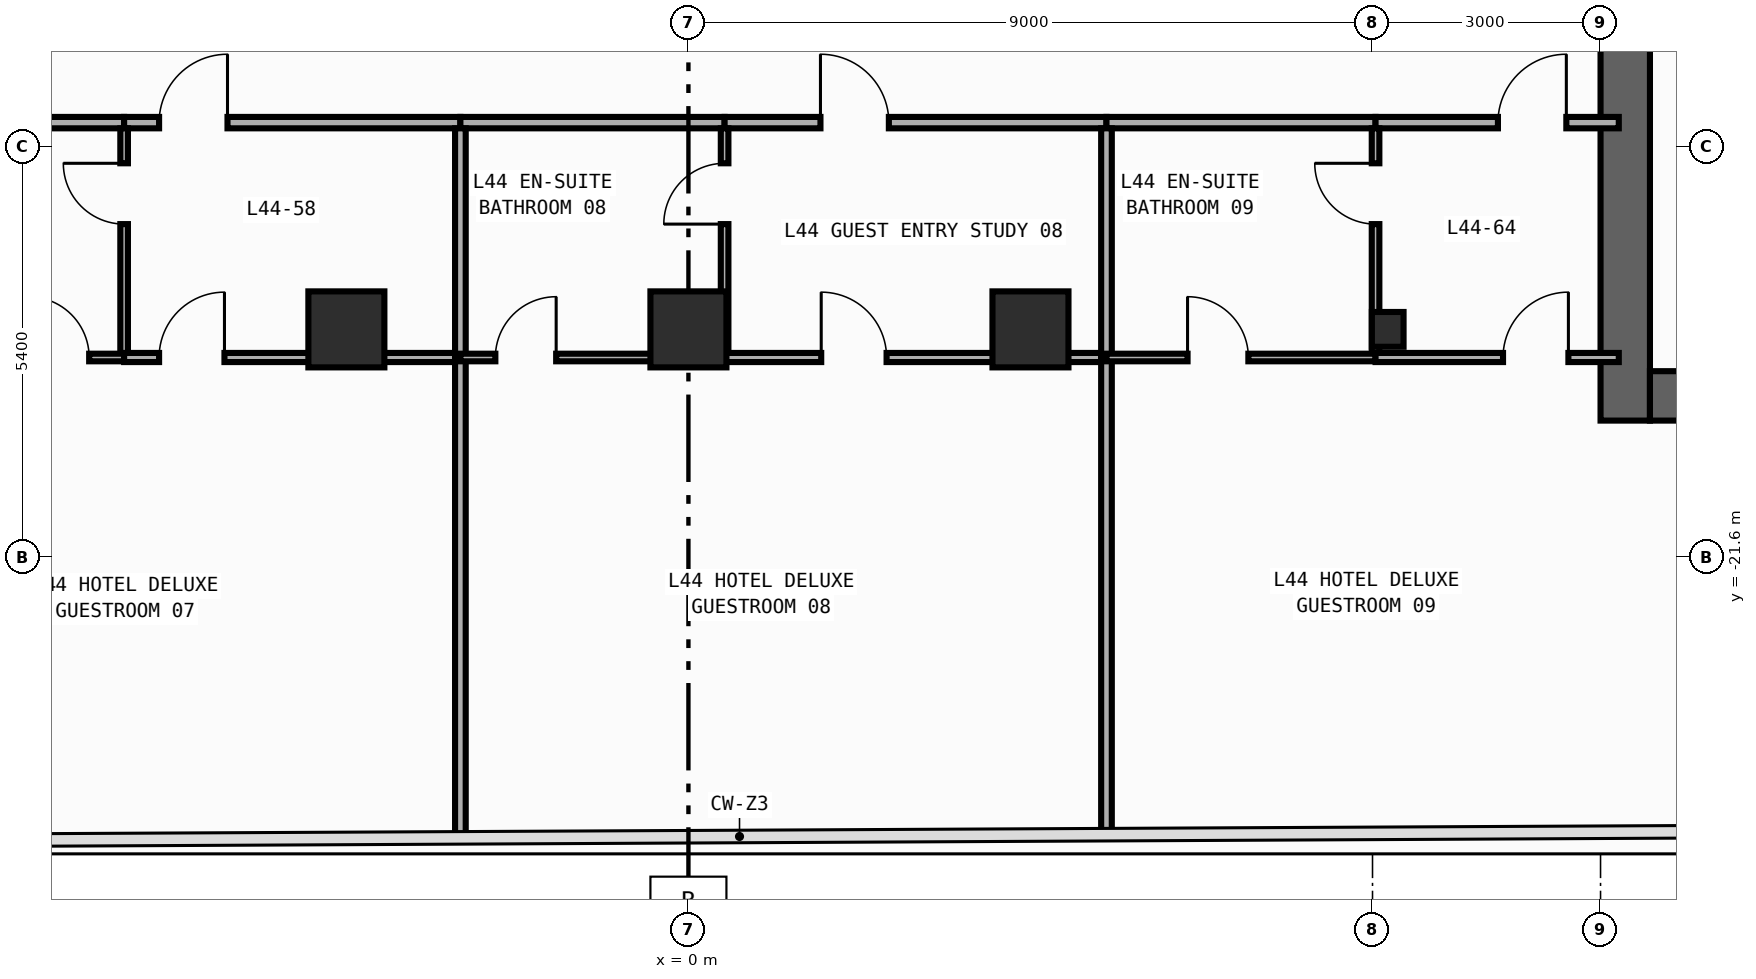
"""IFC4 building model, lengths in metres.
Left out: names, types, materials, properties, quantities, classifications, styles, units other than length and angle.
Written with IfcOpenShell. Run it as: python <this file> out.ifc"""

import sys

from ifc_helpers import new_model, si_unit, direction, frame, frame_2d, origin, origin_2d, place, context, subcontext, project, spatial, rectangle, i_section, extrude, element, fill, save


model = new_model("IFC4")
c1 = context("Model", 3, precision=1e-05, world=origin(), true_north=direction((0.0, 1.0)))
c2 = subcontext(c1, "Body", "Model", "MODEL_VIEW")
j1 = project(units=[si_unit("LENGTHUNIT", "METRE"), si_unit("PLANEANGLEUNIT", "RADIAN")], contexts=[c1])
p1 = place(None, origin())
s1 = spatial("IfcSite", under=j1, at=p1, CompositionType="ELEMENT")
p2 = place(p1, origin())
s2 = spatial("IfcBuilding", under=s1, at=p2, CompositionType="ELEMENT")
p3 = place(p2, frame((0.0, 0.0, 191.6)))
s3 = spatial("IfcBuildingStorey", under=s2, at=p3, CompositionType="ELEMENT", Elevation=191.6)
p4 = place(p3, frame((12.325, -19.8, 0.0), z_axis=(0.0, 0.0, 1.0), x_axis=(0.0, 1.0, 0.0)))
e1 = element("IfcWall", 1, at=p4, inside=s3, PredefinedType="SHEAR", context=c2, shape_type="SweptSolid", body=[
    extrude(rectangle(XDim=27.0, YDim=0.65, at=frame_2d((13.5, 0.0))), origin(), (0.0, 0.0, 1.0), 3.54),
])
p5 = place(p4, frame((23.05, 0.0, 0.0)))
e2 = element("IfcOpeningElement", 2, at=p5, cuts=e1, PredefinedType="OPENING", context=c2, shape_type="SweptSolid", body=[
    extrude(rectangle(XDim=1.1, YDim=2.2, at=frame_2d((0.55, 1.1))), frame((0.0, 0.335, 0.0), z_axis=(0.0, -1.0, 0.0), x_axis=(1.0, 0.0, 0.0)), (0.0, 0.0, 1.0), 0.67),
])
p6 = place(p4, frame((19.85, 0.0, 0.0)))
e3 = element("IfcOpeningElement", 3, at=p6, cuts=e1, PredefinedType="OPENING", context=c2, shape_type="SweptSolid", body=[
    extrude(rectangle(XDim=1.1, YDim=2.2, at=frame_2d((0.55, 1.1))), frame((0.0, 0.335, 0.0), z_axis=(0.0, -1.0, 0.0), x_axis=(1.0, 0.0, 0.0)), (0.0, 0.0, 1.0), 0.67),
])
p7 = place(p4, frame((16.65, 0.0, 0.0)))
e4 = element("IfcOpeningElement", 4, at=p7, cuts=e1, PredefinedType="OPENING", context=c2, shape_type="SweptSolid", body=[
    extrude(rectangle(XDim=1.1, YDim=2.2, at=frame_2d((0.55, 1.1))), frame((0.0, 0.335, 0.0), z_axis=(0.0, -1.0, 0.0), x_axis=(1.0, 0.0, 0.0)), (0.0, 0.0, 1.0), 0.67),
])
p8 = place(p4, frame((7.175, 0.0, 0.0)))
e5 = element("IfcOpeningElement", 5, at=p8, cuts=e1, PredefinedType="OPENING", context=c2, shape_type="SweptSolid", body=[
    extrude(rectangle(XDim=0.85, YDim=2.1, at=frame_2d((0.425, 1.05))), frame((0.0, 0.335, 0.0), z_axis=(0.0, -1.0, 0.0), x_axis=(1.0, 0.0, 0.0)), (0.0, 0.0, 1.0), 0.67),
])
p9 = place(p4, frame((10.375, 0.0, 0.0)))
e6 = element("IfcOpeningElement", 6, at=p9, cuts=e1, PredefinedType="OPENING", context=c2, shape_type="SweptSolid", body=[
    extrude(rectangle(XDim=0.85, YDim=2.1, at=frame_2d((0.425, 1.05))), frame((0.0, 0.335, 0.0), z_axis=(0.0, -1.0, 0.0), x_axis=(1.0, 0.0, 0.0)), (0.0, 0.0, 1.0), 0.67),
])
p10 = place(p4, frame((12.725, 0.0, 0.0)))
e7 = element("IfcOpeningElement", 7, at=p10, cuts=e1, PredefinedType="OPENING", context=c2, shape_type="SweptSolid", body=[
    extrude(rectangle(XDim=1.15, YDim=2.2, at=frame_2d((0.575, 1.1))), frame((0.0, 0.335, 0.0), z_axis=(0.0, -1.0, 0.0), x_axis=(1.0, 0.0, 0.0)), (0.0, 0.0, 1.0), 0.67),
])
p11 = place(p4, frame((25.125, 0.0, 0.0)))
e8 = element("IfcOpeningElement", 8, at=p11, cuts=e1, PredefinedType="OPENING", context=c2, shape_type="SweptSolid", body=[
    extrude(rectangle(XDim=0.85, YDim=2.1, at=frame_2d((0.425, 1.05))), frame((0.0, 0.335, 0.0), z_axis=(0.0, -1.0, 0.0), x_axis=(1.0, 0.0, 0.0)), (0.0, 0.0, 1.0), 0.67),
])
p12 = place(p3, frame((12.65, -19.475, 0.0), z_axis=(0.0, 0.0, 1.0), x_axis=(1.0, 0.0, 0.0)))
e9 = element("IfcWall", 9, at=p12, inside=s3, PredefinedType="SHEAR", context=c2, shape_type="SweptSolid", body=[
    extrude(rectangle(XDim=7.1, YDim=0.65, at=frame_2d((3.55, 0.0))), origin(), (0.0, 0.0, 1.0), 3.54),
])
p13 = place(p3, frame((9.2, -18.6, 0.0), z_axis=(0.0, 0.0, 1.0), x_axis=(1.0, 0.0, 0.0)))
e10 = element("IfcColumn", 10, at=p13, inside=s3, PredefinedType="COLUMN", context=c2, shape_type="SweptSolid", body=[
    extrude(i_section(OverallWidth=0.417, OverallDepth=0.458, WebThickness=0.03, FlangeThickness=0.05, FilletRadius=0.022, at=origin_2d()), origin(), (0.0, 0.0, 1.0), 3.8),
])
for number, where, z_axis, x_axis in (
    (11, (-4.5, -18.6, 0.0), (0.0, 0.0, 1.0), (1.0, 0.0, 0.0)),
    (12, (0.0, -18.6, 0.0), (0.0, 0.0, 1.0), (1.0, 0.0, 0.0)),
    (13, (4.5, -18.6, 0.0), (0.0, 0.0, 1.0), (1.0, 0.0, 0.0)),
):
    element("IfcColumn", number, at=place(p3, frame(where, z_axis=z_axis, x_axis=x_axis)), inside=s3, PredefinedType="COLUMN", context=c2, shape_type="SweptSolid", body=[
        extrude(rectangle(XDim=1.0, YDim=1.0, at=origin_2d()), origin(), (0.0, 0.0, 1.0), 3.8),
    ])
p14 = place(p3, frame((-10.5, -15.88, 0.0), z_axis=(0.0, 0.0, 1.0), x_axis=(1.0, 0.0, 0.0)))
e14 = element("IfcWall", 14, at=p14, inside=s3, PredefinedType="PARTITIONING", context=c2, shape_type="SweptSolid", body=[
    extrude(rectangle(XDim=3.076, YDim=0.15, at=frame_2d((1.538, 0.0))), origin(), (0.0, 0.0, 1.0), 3.54),
])
p15 = place(p3, frame((-7.424, -15.88, 0.0), z_axis=(0.0, 0.0, 1.0), x_axis=(1.0, 0.0, 0.0)))
e15 = element("IfcWall", 15, at=p15, inside=s3, PredefinedType="PARTITIONING", context=c2, shape_type="SweptSolid", body=[
    extrude(rectangle(XDim=4.424, YDim=0.15, at=frame_2d((2.212, 0.0))), origin(), (0.0, 0.0, 1.0), 3.54),
])
p16 = place(p15, frame((0.46, 0.0, 0.0)))
e16 = element("IfcOpeningElement", 16, at=p16, cuts=e15, PredefinedType="OPENING", context=c2, shape_type="SweptSolid", body=[
    extrude(rectangle(XDim=0.9, YDim=2.15, at=frame_2d((0.45, 1.075))), frame((0.0, 0.085, 0.0), z_axis=(0.0, -1.0, 0.0), x_axis=(1.0, 0.0, 0.0)), (0.0, 0.0, 1.0), 0.17),
])
p17 = place(p3, frame((-3.0, -15.88, 0.0), z_axis=(0.0, 0.0, 1.0), x_axis=(1.0, 0.0, 0.0)))
e17 = element("IfcWall", 17, at=p17, inside=s3, PredefinedType="PARTITIONING", context=c2, shape_type="SweptSolid", body=[
    extrude(rectangle(XDim=3.476, YDim=0.15, at=frame_2d((1.738, 0.0))), origin(), (0.0, 0.0, 1.0), 3.54),
])
p18 = place(p3, frame((0.476, -15.88, 0.0), z_axis=(0.0, 0.0, 1.0), x_axis=(1.0, 0.0, 0.0)))
e18 = element("IfcWall", 18, at=p18, inside=s3, PredefinedType="PARTITIONING", context=c2, shape_type="SweptSolid", body=[
    extrude(rectangle(XDim=5.024, YDim=0.15, at=frame_2d((2.512, 0.0))), origin(), (0.0, 0.0, 1.0), 3.54),
])
p19 = place(p18, frame((1.261, 0.0, 0.0)))
e19 = element("IfcOpeningElement", 19, at=p19, cuts=e18, PredefinedType="OPENING", context=c2, shape_type="SweptSolid", body=[
    extrude(rectangle(XDim=0.9, YDim=2.15, at=frame_2d((0.45, 1.075))), frame((0.0, 0.085, 0.0), z_axis=(0.0, -1.0, 0.0), x_axis=(1.0, 0.0, 0.0)), (0.0, 0.0, 1.0), 0.17),
])
p20 = place(p3, frame((5.5, -15.88, 0.0), z_axis=(0.0, 0.0, 1.0), x_axis=(1.0, 0.0, 0.0)))
e20 = element("IfcWall", 20, at=p20, inside=s3, PredefinedType="PARTITIONING", context=c2, shape_type="SweptSolid", body=[
    extrude(rectangle(XDim=3.54, YDim=0.15, at=frame_2d((1.77, 0.0))), origin(), (0.0, 0.0, 1.0), 3.54),
])
p21 = place(p3, frame((9.04, -15.88, 0.0), z_axis=(0.0, 0.0, 1.0), x_axis=(1.0, 0.0, 0.0)))
e21 = element("IfcWall", 21, at=p21, inside=s3, PredefinedType="PARTITIONING", context=c2, shape_type="SweptSolid", body=[
    extrude(rectangle(XDim=3.2, YDim=0.15, at=frame_2d((1.6, 0.0))), origin(), (0.0, 0.0, 1.0), 3.54),
])
p22 = place(p21, frame((1.61, 0.0, 0.0)))
e22 = element("IfcOpeningElement", 22, at=p22, cuts=e21, PredefinedType="OPENING", context=c2, shape_type="SweptSolid", body=[
    extrude(rectangle(XDim=0.9, YDim=2.15, at=frame_2d((0.45, 1.075))), frame((0.0, 0.085, 0.0), z_axis=(0.0, -1.0, 0.0), x_axis=(1.0, 0.0, 0.0)), (0.0, 0.0, 1.0), 0.17),
])
p23 = place(p3, frame((-7.424, -18.92, 0.0), z_axis=(0.0, 0.0, 1.0), x_axis=(0.0, 1.0, 0.0)))
e23 = element("IfcWall", 23, at=p23, inside=s3, PredefinedType="PARTITIONING", context=c2, shape_type="SweptSolid", body=[
    extrude(rectangle(XDim=2.965, YDim=0.1, at=frame_2d((1.482, 0.0))), origin(), (0.0, 0.0, 1.0), 3.54),
])
p24 = place(p23, frame((1.705, 0.0, 0.0)))
e24 = element("IfcOpeningElement", 24, at=p24, cuts=e23, PredefinedType="OPENING", context=c2, shape_type="SweptSolid", body=[
    extrude(rectangle(XDim=0.8, YDim=2.1, at=frame_2d((0.4, 1.05))), frame((0.0, 0.06, 0.0), z_axis=(0.0, -1.0, 0.0), x_axis=(1.0, 0.0, 0.0)), (0.0, 0.0, 1.0), 0.12),
])
p25 = place(p3, frame((-10.5, -18.97, 0.0), z_axis=(0.0, 0.0, 1.0), x_axis=(1.0, 0.0, 0.0)))
e25 = element("IfcWall", 25, at=p25, inside=s3, PredefinedType="PARTITIONING", context=c2, shape_type="SweptSolid", body=[
    extrude(rectangle(XDim=3.076, YDim=0.1, at=frame_2d((1.538, 0.0))), origin(), (0.0, 0.0, 1.0), 3.54),
])
p26 = place(p25, frame((1.816, 0.0, 0.0)))
e26 = element("IfcOpeningElement", 26, at=p26, cuts=e25, PredefinedType="OPENING", context=c2, shape_type="SweptSolid", body=[
    extrude(rectangle(XDim=0.8, YDim=2.1, at=frame_2d((0.4, 1.05))), frame((0.0, 0.06, 0.0), z_axis=(0.0, -1.0, 0.0), x_axis=(1.0, 0.0, 0.0)), (0.0, 0.0, 1.0), 0.12),
])
p27 = place(p3, frame((-7.424, -18.97, 0.0), z_axis=(0.0, 0.0, 1.0), x_axis=(1.0, 0.0, 0.0)))
e27 = element("IfcWall", 27, at=p27, inside=s3, PredefinedType="PARTITIONING", context=c2, shape_type="SweptSolid", body=[
    extrude(rectangle(XDim=4.424, YDim=0.12, at=frame_2d((2.212, 0.0))), origin(), (0.0, 0.0, 1.0), 3.54),
])
p28 = place(p27, frame((0.46, 0.0, 0.0)))
e28 = element("IfcOpeningElement", 28, at=p28, cuts=e27, PredefinedType="OPENING", context=c2, shape_type="SweptSolid", body=[
    extrude(rectangle(XDim=0.86, YDim=2.15, at=frame_2d((0.43, 1.075))), frame((0.0, 0.07, 0.0), z_axis=(0.0, -1.0, 0.0), x_axis=(1.0, 0.0, 0.0)), (0.0, 0.0, 1.0), 0.14),
])
p29 = place(p3, frame((-3.0, -18.97, 0.0), z_axis=(0.0, 0.0, 1.0), x_axis=(0.0, 1.0, 0.0)))
e29 = element("IfcWall", 29, at=p29, inside=s3, PredefinedType="PARTITIONING", context=c2, shape_type="SweptSolid", body=[
    extrude(rectangle(XDim=3.015, YDim=0.14, at=frame_2d((1.507, 0.0))), origin(), (0.0, 0.0, 1.0), 3.54),
])
p30 = place(p3, frame((-3.0, -25.285, 0.0), z_axis=(0.0, 0.0, 1.0), x_axis=(0.0, 1.0, 0.0)))
e30 = element("IfcWall", 30, at=p30, inside=s3, PredefinedType="PARTITIONING", context=c2, shape_type="SweptSolid", body=[
    extrude(rectangle(XDim=6.315, YDim=0.14, at=frame_2d((3.157, 0.0))), origin(), (0.0, 0.0, 1.0), 3.54),
])
p31 = place(p3, frame((0.476, -18.92, 0.0), z_axis=(0.0, 0.0, 1.0), x_axis=(0.0, 1.0, 0.0)))
e31 = element("IfcWall", 31, at=p31, inside=s3, PredefinedType="PARTITIONING", context=c2, shape_type="SweptSolid", body=[
    extrude(rectangle(XDim=2.965, YDim=0.1, at=frame_2d((1.482, 0.0))), origin(), (0.0, 0.0, 1.0), 3.54),
])
p32 = place(p31, frame((1.705, 0.0, 0.0)))
e32 = element("IfcOpeningElement", 32, at=p32, cuts=e31, PredefinedType="OPENING", context=c2, shape_type="SweptSolid", body=[
    extrude(rectangle(XDim=0.8, YDim=2.1, at=frame_2d((0.4, 1.05))), frame((0.0, 0.06, 0.0), z_axis=(0.0, -1.0, 0.0), x_axis=(1.0, 0.0, 0.0)), (0.0, 0.0, 1.0), 0.12),
])
p33 = place(p3, frame((-3.0, -18.97, 0.0), z_axis=(0.0, 0.0, 1.0), x_axis=(1.0, 0.0, 0.0)))
e33 = element("IfcWall", 33, at=p33, inside=s3, PredefinedType="PARTITIONING", context=c2, shape_type="SweptSolid", body=[
    extrude(rectangle(XDim=3.476, YDim=0.1, at=frame_2d((1.738, 0.0))), origin(), (0.0, 0.0, 1.0), 3.54),
])
p34 = place(p33, frame((0.46, 0.0, 0.0)))
e34 = element("IfcOpeningElement", 34, at=p34, cuts=e33, PredefinedType="OPENING", context=c2, shape_type="SweptSolid", body=[
    extrude(rectangle(XDim=0.8, YDim=2.1, at=frame_2d((0.4, 1.05))), frame((0.0, 0.06, 0.0), z_axis=(0.0, -1.0, 0.0), x_axis=(1.0, 0.0, 0.0)), (0.0, 0.0, 1.0), 0.12),
])
p35 = place(p3, frame((0.476, -18.97, 0.0), z_axis=(0.0, 0.0, 1.0), x_axis=(1.0, 0.0, 0.0)))
e35 = element("IfcWall", 35, at=p35, inside=s3, PredefinedType="PARTITIONING", context=c2, shape_type="SweptSolid", body=[
    extrude(rectangle(XDim=5.024, YDim=0.12, at=frame_2d((2.512, 0.0))), origin(), (0.0, 0.0, 1.0), 3.54),
])
p36 = place(p35, frame((1.271, 0.0, 0.0)))
e36 = element("IfcOpeningElement", 36, at=p36, cuts=e35, PredefinedType="OPENING", context=c2, shape_type="SweptSolid", body=[
    extrude(rectangle(XDim=0.86, YDim=2.15, at=frame_2d((0.43, 1.075))), frame((0.0, 0.07, 0.0), z_axis=(0.0, -1.0, 0.0), x_axis=(1.0, 0.0, 0.0)), (0.0, 0.0, 1.0), 0.14),
])
p37 = place(p3, frame((5.5, -18.97, 0.0), z_axis=(0.0, 0.0, 1.0), x_axis=(0.0, 1.0, 0.0)))
e37 = element("IfcWall", 37, at=p37, inside=s3, PredefinedType="PARTITIONING", context=c2, shape_type="SweptSolid", body=[
    extrude(rectangle(XDim=3.015, YDim=0.14, at=frame_2d((1.507, 0.0))), origin(), (0.0, 0.0, 1.0), 3.54),
])
p38 = place(p3, frame((5.5, -25.243, 0.0), z_axis=(0.0, 0.0, 1.0), x_axis=(0.0, 1.0, 0.0)))
e38 = element("IfcWall", 38, at=p38, inside=s3, PredefinedType="PARTITIONING", context=c2, shape_type="SweptSolid", body=[
    extrude(rectangle(XDim=6.273, YDim=0.14, at=frame_2d((3.136, 0.0))), origin(), (0.0, 0.0, 1.0), 3.54),
])
p39 = place(p3, frame((9.04, -18.92, 0.0), z_axis=(0.0, 0.0, 1.0), x_axis=(0.0, 1.0, 0.0)))
e39 = element("IfcWall", 39, at=p39, inside=s3, PredefinedType="PARTITIONING", context=c2, shape_type="SweptSolid", body=[
    extrude(rectangle(XDim=2.965, YDim=0.1, at=frame_2d((1.482, 0.0))), origin(), (0.0, 0.0, 1.0), 2.952),
])
p40 = place(p39, frame((1.705, 0.0, 0.0)))
e40 = element("IfcOpeningElement", 40, at=p40, cuts=e39, PredefinedType="OPENING", context=c2, shape_type="SweptSolid", body=[
    extrude(rectangle(XDim=0.8, YDim=2.1, at=frame_2d((0.4, 1.05))), frame((0.0, 0.06, 0.0), z_axis=(0.0, -1.0, 0.0), x_axis=(1.0, 0.0, 0.0)), (0.0, 0.0, 1.0), 0.12),
])
p41 = place(p3, frame((5.5, -18.97, 0.0), z_axis=(0.0, 0.0, 1.0), x_axis=(1.0, 0.0, 0.0)))
e41 = element("IfcWall", 41, at=p41, inside=s3, PredefinedType="PARTITIONING", context=c2, shape_type="SweptSolid", body=[
    extrude(rectangle(XDim=3.54, YDim=0.1, at=frame_2d((1.77, 0.0))), origin(), (0.0, 0.0, 1.0), 3.54),
])
p42 = place(p41, frame((1.067, 0.0, 0.0)))
e42 = element("IfcOpeningElement", 42, at=p42, cuts=e41, PredefinedType="OPENING", context=c2, shape_type="SweptSolid", body=[
    extrude(rectangle(XDim=0.8, YDim=2.1, at=frame_2d((0.4, 1.05))), frame((0.0, 0.06, 0.0), z_axis=(0.0, -1.0, 0.0), x_axis=(1.0, 0.0, 0.0)), (0.0, 0.0, 1.0), 0.12),
])
p43 = place(p3, frame((9.04, -18.97, 0.0), z_axis=(0.0, 0.0, 1.0), x_axis=(1.0, 0.0, 0.0)))
e43 = element("IfcWall", 43, at=p43, inside=s3, PredefinedType="PARTITIONING", context=c2, shape_type="SweptSolid", body=[
    extrude(rectangle(XDim=3.2, YDim=0.12, at=frame_2d((1.6, 0.0))), origin(), (0.0, 0.0, 1.0), 3.54),
])
p44 = place(p43, frame((1.677, 0.0, 0.0)))
e44 = element("IfcOpeningElement", 44, at=p44, cuts=e43, PredefinedType="OPENING", context=c2, shape_type="SweptSolid", body=[
    extrude(rectangle(XDim=0.86, YDim=2.15, at=frame_2d((0.43, 1.075))), frame((0.0, 0.07, 0.0), z_axis=(0.0, -1.0, 0.0), x_axis=(1.0, 0.0, 0.0)), (0.0, 0.0, 1.0), 0.14),
])
p45 = place(p16, origin())
e45 = element("IfcDoor", 45, at=p45, inside=s3, OperationType="SINGLE_SWING_RIGHT", PredefinedType="DOOR", context=c2, shape_type="SweptSolid", body=[
    extrude(rectangle(XDim=0.9, YDim=2.15, at=frame_2d((0.45, 1.075))), frame((0.0, 0.025, 0.0), z_axis=(0.0, -1.0, 0.0), x_axis=(1.0, 0.0, 0.0)), (0.0, 0.0, 1.0), 0.05),
])
fill(e16, e45)
p46 = place(p19, origin())
e46 = element("IfcDoor", 46, at=p46, inside=s3, OperationType="SINGLE_SWING_LEFT", PredefinedType="DOOR", context=c2, shape_type="SweptSolid", body=[
    extrude(rectangle(XDim=0.9, YDim=2.15, at=frame_2d((0.45, 1.075))), frame((0.0, 0.025, 0.0), z_axis=(0.0, -1.0, 0.0), x_axis=(1.0, 0.0, 0.0)), (0.0, 0.0, 1.0), 0.05),
])
fill(e19, e46)
p47 = place(p22, origin())
e47 = element("IfcDoor", 47, at=p47, inside=s3, OperationType="SINGLE_SWING_RIGHT", PredefinedType="DOOR", context=c2, shape_type="SweptSolid", body=[
    extrude(rectangle(XDim=0.9, YDim=2.15, at=frame_2d((0.45, 1.075))), frame((0.0, 0.025, 0.0), z_axis=(0.0, -1.0, 0.0), x_axis=(1.0, 0.0, 0.0)), (0.0, 0.0, 1.0), 0.05),
])
fill(e22, e47)
p48 = place(p24, origin())
e48 = element("IfcDoor", 48, at=p48, inside=s3, OperationType="SINGLE_SWING_RIGHT", PredefinedType="DOOR", context=c2, shape_type="SweptSolid", body=[
    extrude(rectangle(XDim=0.8, YDim=2.1, at=frame_2d((0.4, 1.05))), frame((0.0, 0.025, 0.0), z_axis=(0.0, -1.0, 0.0), x_axis=(1.0, 0.0, 0.0)), (0.0, 0.0, 1.0), 0.05),
])
fill(e24, e48)
p49 = place(p26, origin())
e49 = element("IfcDoor", 49, at=p49, inside=s3, OperationType="SINGLE_SWING_LEFT", PredefinedType="DOOR", context=c2, shape_type="SweptSolid", body=[
    extrude(rectangle(XDim=0.8, YDim=2.1, at=frame_2d((0.4, 1.05))), frame((0.0, 0.025, 0.0), z_axis=(0.0, -1.0, 0.0), x_axis=(1.0, 0.0, 0.0)), (0.0, 0.0, 1.0), 0.05),
])
fill(e26, e49)
p50 = place(p28, origin())
e50 = element("IfcDoor", 50, at=p50, inside=s3, OperationType="SINGLE_SWING_RIGHT", PredefinedType="DOOR", context=c2, shape_type="SweptSolid", body=[
    extrude(rectangle(XDim=0.86, YDim=2.15, at=frame_2d((0.43, 1.075))), frame((0.0, 0.025, 0.0), z_axis=(0.0, -1.0, 0.0), x_axis=(1.0, 0.0, 0.0)), (0.0, 0.0, 1.0), 0.05),
])
fill(e28, e50)
p51 = place(p32, origin())
e51 = element("IfcDoor", 51, at=p51, inside=s3, OperationType="SINGLE_SWING_LEFT", PredefinedType="DOOR", context=c2, shape_type="SweptSolid", body=[
    extrude(rectangle(XDim=0.8, YDim=2.1, at=frame_2d((0.4, 1.05))), frame((0.0, 0.025, 0.0), z_axis=(0.0, -1.0, 0.0), x_axis=(1.0, 0.0, 0.0)), (0.0, 0.0, 1.0), 0.05),
])
fill(e32, e51)
p52 = place(p34, origin())
e52 = element("IfcDoor", 52, at=p52, inside=s3, OperationType="SINGLE_SWING_RIGHT", PredefinedType="DOOR", context=c2, shape_type="SweptSolid", body=[
    extrude(rectangle(XDim=0.8, YDim=2.1, at=frame_2d((0.4, 1.05))), frame((0.0, 0.025, 0.0), z_axis=(0.0, -1.0, 0.0), x_axis=(1.0, 0.0, 0.0)), (0.0, 0.0, 1.0), 0.05),
])
fill(e34, e52)
p53 = place(p36, origin())
e53 = element("IfcDoor", 53, at=p53, inside=s3, OperationType="SINGLE_SWING_LEFT", PredefinedType="DOOR", context=c2, shape_type="SweptSolid", body=[
    extrude(rectangle(XDim=0.86, YDim=2.15, at=frame_2d((0.43, 1.075))), frame((0.0, 0.025, 0.0), z_axis=(0.0, -1.0, 0.0), x_axis=(1.0, 0.0, 0.0)), (0.0, 0.0, 1.0), 0.05),
])
fill(e36, e53)
p54 = place(p40, origin())
e54 = element("IfcDoor", 54, at=p54, inside=s3, OperationType="SINGLE_SWING_RIGHT", PredefinedType="DOOR", context=c2, shape_type="SweptSolid", body=[
    extrude(rectangle(XDim=0.8, YDim=2.1, at=frame_2d((0.4, 1.05))), frame((0.0, 0.025, 0.0), z_axis=(0.0, -1.0, 0.0), x_axis=(1.0, 0.0, 0.0)), (0.0, 0.0, 1.0), 0.05),
])
fill(e40, e54)
p55 = place(p42, origin())
e55 = element("IfcDoor", 55, at=p55, inside=s3, OperationType="SINGLE_SWING_LEFT", PredefinedType="DOOR", context=c2, shape_type="SweptSolid", body=[
    extrude(rectangle(XDim=0.8, YDim=2.1, at=frame_2d((0.4, 1.05))), frame((0.0, 0.025, 0.0), z_axis=(0.0, -1.0, 0.0), x_axis=(1.0, 0.0, 0.0)), (0.0, 0.0, 1.0), 0.05),
])
fill(e42, e55)
p56 = place(p44, origin())
e56 = element("IfcDoor", 56, at=p56, inside=s3, OperationType="SINGLE_SWING_RIGHT", PredefinedType="DOOR", context=c2, shape_type="SweptSolid", body=[
    extrude(rectangle(XDim=0.86, YDim=2.15, at=frame_2d((0.43, 1.075))), frame((0.0, 0.025, 0.0), z_axis=(0.0, -1.0, 0.0), x_axis=(1.0, 0.0, 0.0)), (0.0, 0.0, 1.0), 0.05),
])
fill(e44, e56)
save(model, sys.argv[1])
